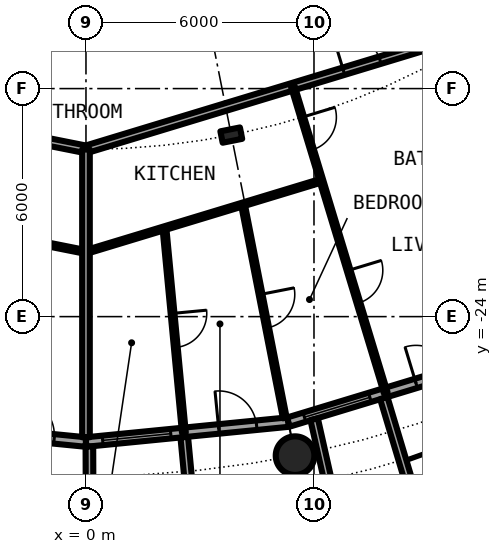
"""IFC4 building model, lengths in metres.
Left out: names, types, materials, properties, quantities, classifications, styles, units other than length and angle.
Written with IfcOpenShell. Run it as: python <this file> out.ifc"""

import sys

from ifc_helpers import new_model, si_unit, direction, frame, frame_2d, origin, origin_2d, place, context, subcontext, project, spatial, rectangle, hollow_circle, i_section, extrude, element, fill, save


model = new_model("IFC4")
c1 = context("Model", 3, precision=1e-05, world=origin(), true_north=direction((0.0, 1.0)))
c2 = subcontext(c1, "Body", "Model", "MODEL_VIEW")
j1 = project(units=[si_unit("LENGTHUNIT", "METRE"), si_unit("PLANEANGLEUNIT", "RADIAN")], contexts=[c1])
p1 = place(None, origin())
s1 = spatial("IfcSite", under=j1, at=p1, CompositionType="ELEMENT")
p2 = place(p1, origin())
s2 = spatial("IfcBuilding", under=s1, at=p2, CompositionType="ELEMENT")
p3 = place(p2, frame((0.0, 0.0, 91.05)))
s3 = spatial("IfcBuildingStorey", under=s2, at=p3, CompositionType="ELEMENT", Elevation=91.05)
p4 = place(p3, frame((5.501, -27.658, 0.0), z_axis=(0.0, 0.0, 1.0), x_axis=(1.0, 0.0, 0.0)))
e1 = element("IfcColumn", 1, at=p4, inside=s3, PredefinedType="COLUMN", context=c2, shape_type="SweptSolid", body=[
    extrude(hollow_circle(Radius=0.508, WallThickness=0.04, at=origin_2d()), origin(), (0.0, 0.0, 1.0), 3.05),
])
p5 = place(p3, frame((3.824, -19.223, 0.0), z_axis=(0.0, 0.0, 1.0), x_axis=(0.195090322016, -0.980785280403, 0.0)))
e2 = element("IfcColumn", 2, at=p5, inside=s3, PredefinedType="COLUMN", context=c2, shape_type="SweptSolid", body=[
    extrude(i_section(OverallWidth=0.306, OverallDepth=0.524, WebThickness=0.021, FlangeThickness=0.04, FilletRadius=0.027, at=origin_2d()), origin(), (0.0, 0.0, 1.0), 3.05),
])
p6 = place(p3, frame((-5.326, -26.775, 0.0), z_axis=(0.0, 0.0, 1.0), x_axis=(0.995173996315, -0.098126026407, 0.0)))
e3 = element("IfcWall", 3, at=p6, inside=s3, PredefinedType="SOLIDWALL", context=c2, shape_type="SweptSolid", body=[
    extrude(rectangle(XDim=5.352, YDim=0.25, at=frame_2d((2.676, 0.0))), origin(), (0.0, 0.0, 1.0), 2.7),
])
p7 = place(p6, frame((0.441, 0.0, 0.3)))
e4 = element("IfcOpeningElement", 4, at=p7, cuts=e3, PredefinedType="OPENING", context=c2, shape_type="SweptSolid", body=[
    extrude(rectangle(XDim=1.8, YDim=2.1, at=frame_2d((0.9, 1.05))), frame((0.0, 0.135, 0.0), z_axis=(0.0, -1.0, 0.0), x_axis=(1.0, 0.0, 0.0)), (0.0, 0.0, 1.0), 0.27),
])
p8 = place(p6, frame((3.51, 0.0, 0.0)))
e5 = element("IfcOpeningElement", 5, at=p8, cuts=e3, PredefinedType="OPENING", context=c2, shape_type="SweptSolid", body=[
    extrude(rectangle(XDim=1.0, YDim=2.2, at=frame_2d((0.5, 1.1))), frame((0.0, 0.135, 0.0), z_axis=(0.0, -1.0, 0.0), x_axis=(1.0, 0.0, 0.0)), (0.0, 0.0, 1.0), 0.27),
])
p9 = place(p3, frame((0.0, -27.3, 0.0), z_axis=(0.0, 0.0, 1.0), x_axis=(0.995173996315, 0.098126026407, 0.0)))
e6 = element("IfcWall", 6, at=p9, inside=s3, PredefinedType="SOLIDWALL", context=c2, shape_type="SweptSolid", body=[
    extrude(rectangle(XDim=5.352, YDim=0.25, at=frame_2d((2.676, 0.0))), origin(), (0.0, 0.0, 1.0), 2.7),
])
p10 = place(p9, frame((0.441, 0.0, 0.3)))
e7 = element("IfcOpeningElement", 7, at=p10, cuts=e6, PredefinedType="OPENING", context=c2, shape_type="SweptSolid", body=[
    extrude(rectangle(XDim=1.8, YDim=2.1, at=frame_2d((0.9, 1.05))), frame((0.0, 0.135, 0.0), z_axis=(0.0, -1.0, 0.0), x_axis=(1.0, 0.0, 0.0)), (0.0, 0.0, 1.0), 0.27),
])
p11 = place(p9, frame((3.51, 0.0, 0.0)))
e8 = element("IfcOpeningElement", 8, at=p11, cuts=e6, PredefinedType="OPENING", context=c2, shape_type="SweptSolid", body=[
    extrude(rectangle(XDim=1.0, YDim=2.2, at=frame_2d((0.5, 1.1))), frame((0.0, 0.135, 0.0), z_axis=(0.0, -1.0, 0.0), x_axis=(1.0, 0.0, 0.0)), (0.0, 0.0, 1.0), 0.27),
])
p12 = place(p3, frame((0.09, -27.417, -0.03), z_axis=(0.0, 0.0, 1.0), x_axis=(0.00347308367, -0.999993968827, 0.0)))
e9 = element("IfcWall", 9, at=p12, inside=s3, PredefinedType="SOLIDWALL", context=c2, shape_type="SweptSolid", body=[
    extrude(rectangle(XDim=2.882, YDim=0.2, at=frame_2d((1.441, 0.0))), origin(), (0.0, 0.0, 1.0), 2.73),
])
p13 = place(p3, frame((2.586, -27.171, -0.03), z_axis=(0.0, 0.0, 1.0), x_axis=(0.094548432284, -0.995520262954, 0.0)))
e10 = element("IfcWall", 10, at=p13, inside=s3, PredefinedType="SOLIDWALL", context=c2, shape_type="SweptSolid", body=[
    extrude(rectangle(XDim=3.006, YDim=0.2, at=frame_2d((1.503, 0.0))), origin(), (0.0, 0.0, 1.0), 2.73),
])
p14 = place(p3, frame((5.326, -26.775, 0.0), z_axis=(0.0, 0.0, 1.0), x_axis=(0.956965678721, 0.290201119486, 0.0)))
e11 = element("IfcWall", 11, at=p14, inside=s3, PredefinedType="SOLIDWALL", context=c2, shape_type="SweptSolid", body=[
    extrude(rectangle(XDim=5.351, YDim=0.25, at=frame_2d((2.676, 0.0))), origin(), (0.0, 0.0, 1.0), 2.7),
])
p15 = place(p14, frame((0.441, 0.0, 0.3)))
e12 = element("IfcOpeningElement", 12, at=p15, cuts=e11, PredefinedType="OPENING", context=c2, shape_type="SweptSolid", body=[
    extrude(rectangle(XDim=1.8, YDim=2.1, at=frame_2d((0.9, 1.05))), frame((0.0, 0.135, 0.0), z_axis=(0.0, -1.0, 0.0), x_axis=(1.0, 0.0, 0.0)), (0.0, 0.0, 1.0), 0.27),
])
p16 = place(p14, frame((3.51, 0.0, 0.0)))
e13 = element("IfcOpeningElement", 13, at=p16, cuts=e11, PredefinedType="OPENING", context=c2, shape_type="SweptSolid", body=[
    extrude(rectangle(XDim=1.0, YDim=2.2, at=frame_2d((0.5, 1.1))), frame((0.0, 0.135, 0.0), z_axis=(0.0, -1.0, 0.0), x_axis=(1.0, 0.0, 0.0)), (0.0, 0.0, 1.0), 0.27),
])
p17 = place(p3, frame((6.004, -26.7, -0.03), z_axis=(0.0, 0.0, 1.0), x_axis=(0.219609259383, -0.975587911566, 0.0)))
e14 = element("IfcWall", 14, at=p17, inside=s3, PredefinedType="SOLIDWALL", context=c2, shape_type="SweptSolid", body=[
    extrude(rectangle(XDim=2.933, YDim=0.2, at=frame_2d((1.466, 0.0))), origin(), (0.0, 0.0, 1.0), 2.73),
])
p18 = place(p3, frame((7.837, -26.144, -0.03), z_axis=(0.0, 0.0, 1.0), x_axis=(0.287064767992, -0.957911174889, 0.0)))
e15 = element("IfcWall", 15, at=p18, inside=s3, PredefinedType="SOLIDWALL", context=c2, shape_type="SweptSolid", body=[
    extrude(rectangle(XDim=3.006, YDim=0.2, at=frame_2d((1.503, 0.0))), origin(), (0.0, 0.0, 1.0), 2.73),
])
p19 = place(p3, frame((-2.133, -21.876, 0.0), z_axis=(0.0, 0.0, 1.0), x_axis=(0.980804550577, -0.194993419292, 0.0)))
e16 = element("IfcWall", 16, at=p19, inside=s3, PredefinedType="PARTITIONING", context=c2, shape_type="SweptSolid", body=[
    extrude(rectangle(XDim=2.175, YDim=0.1, at=frame_2d((1.087, 0.0))), origin(), (0.0, 0.0, 1.0), 2.7),
])
p20 = place(p3, frame((0.0, -22.3, 0.0), z_axis=(0.0, 0.0, 1.0), x_axis=(0.956940987612, 0.290282528286, 0.0)))
e17 = element("IfcWall", 17, at=p20, inside=s3, PredefinedType="PARTITIONING", context=c2, shape_type="SweptSolid", body=[
    extrude(rectangle(XDim=6.477, YDim=0.1, at=frame_2d((3.238, 0.0))), origin(), (0.0, 0.0, 1.0), 2.7),
])
p21 = place(p3, frame((-7.501, -18.108, 0.0), z_axis=(0.0, 0.0, 1.0), x_axis=(0.980781515054, -0.195109250749, 0.0)))
e18 = element("IfcWall", 18, at=p21, inside=s3, PredefinedType="PARTITIONING", context=c2, shape_type="SweptSolid", body=[
    extrude(rectangle(XDim=7.648, YDim=0.2, at=frame_2d((3.824, 0.0))), origin(), (0.0, 0.0, 1.0), 2.38),
])
p22 = place(p21, frame((2.25, 0.0, 0.0)))
e19 = element("IfcOpeningElement", 19, at=p22, cuts=e18, PredefinedType="OPENING", context=c2, shape_type="SweptSolid", body=[
    extrude(rectangle(XDim=1.0, YDim=2.3, at=frame_2d((0.5, 1.15))), frame((0.0, 0.11, 0.0), z_axis=(0.0, -1.0, 0.0), x_axis=(1.0, 0.0, 0.0)), (0.0, 0.0, 1.0), 0.22),
])
p23 = place(p3, frame((0.0, -19.6, 0.0), z_axis=(0.0, 0.0, 1.0), x_axis=(0.956932298225, 0.290311172044, 0.0)))
e20 = element("IfcWall", 20, at=p23, inside=s3, PredefinedType="PARTITIONING", context=c2, shape_type="SweptSolid", body=[
    extrude(rectangle(XDim=11.219, YDim=0.2, at=frame_2d((5.61, 0.0))), origin(), (0.0, 0.0, 1.0), 2.38),
])
p24 = place(p23, frame((7.086, 0.0, 0.0)))
e21 = element("IfcOpeningElement", 21, at=p24, cuts=e20, PredefinedType="OPENING", context=c2, shape_type="SweptSolid", body=[
    extrude(rectangle(XDim=1.0, YDim=2.3, at=frame_2d((0.5, 1.15))), frame((0.0, 0.11, 0.0), z_axis=(0.0, -1.0, 0.0), x_axis=(1.0, 0.0, 0.0)), (0.0, 0.0, 1.0), 0.22),
])
p25 = place(p3, frame((0.0, -27.175, 0.0), z_axis=(0.0, 0.0, 1.0), x_axis=(0.0, 1.0, 0.0)))
e22 = element("IfcWall", 22, at=p25, inside=s3, PredefinedType="PARTITIONING", context=c2, shape_type="SweptSolid", body=[
    extrude(rectangle(XDim=7.575, YDim=0.2, at=frame_2d((3.788, 0.0))), origin(), (0.0, 0.0, 1.0), 2.7),
])
p26 = place(p3, frame((2.065, -21.674, 0.0), z_axis=(0.0, 0.0, 1.0), x_axis=(0.094751520537, -0.99550095397, 0.0)))
e23 = element("IfcWall", 23, at=p26, inside=s3, PredefinedType="PARTITIONING", context=c2, shape_type="SweptSolid", body=[
    extrude(rectangle(XDim=5.403, YDim=0.1, at=frame_2d((2.702, 0.0))), origin(), (0.0, 0.0, 1.0), 2.7),
])
p27 = place(p26, frame((2.252, 0.0, 0.0)))
e24 = element("IfcOpeningElement", 24, at=p27, cuts=e23, PredefinedType="OPENING", context=c2, shape_type="SweptSolid", body=[
    extrude(rectangle(XDim=0.9, YDim=2.3, at=frame_2d((0.45, 1.15))), frame((0.0, 0.06, 0.0), z_axis=(0.0, -1.0, 0.0), x_axis=(1.0, 0.0, 0.0)), (0.0, 0.0, 1.0), 0.12),
])
p28 = place(p3, frame((4.13, -21.047, 0.0), z_axis=(0.0, 0.0, 1.0), x_axis=(0.192433779325, -0.981309961518, 0.0)))
e25 = element("IfcWall", 25, at=p28, inside=s3, PredefinedType="PARTITIONING", context=c2, shape_type="SweptSolid", body=[
    extrude(rectangle(XDim=5.727, YDim=0.1, at=frame_2d((2.863, 0.0))), origin(), (0.0, 0.0, 1.0), 2.7),
])
p29 = place(p28, frame((2.414, 0.0, 0.0)))
e26 = element("IfcOpeningElement", 26, at=p29, cuts=e25, PredefinedType="OPENING", context=c2, shape_type="SweptSolid", body=[
    extrude(rectangle(XDim=0.9, YDim=2.3, at=frame_2d((0.45, 1.15))), frame((0.0, 0.06, 0.0), z_axis=(0.0, -1.0, 0.0), x_axis=(1.0, 0.0, 0.0)), (0.0, 0.0, 1.0), 0.12),
])
p30 = place(p3, frame((5.445, -17.948, 0.0), z_axis=(0.0, 0.0, 1.0), x_axis=(0.290158700753, -0.956978541231, 0.0)))
e27 = element("IfcWall", 27, at=p30, inside=s3, PredefinedType="PARTITIONING", context=c2, shape_type="SweptSolid", body=[
    extrude(rectangle(XDim=8.419, YDim=0.1, at=frame_2d((4.209, 0.0))), origin(), (0.0, 0.0, 1.0), 2.7),
])
p31 = place(p30, frame((0.842, 0.0, 0.0)))
e28 = element("IfcOpeningElement", 28, at=p31, cuts=e27, PredefinedType="OPENING", context=c2, shape_type="SweptSolid", body=[
    extrude(rectangle(XDim=0.9, YDim=2.3, at=frame_2d((0.45, 1.15))), frame((0.0, 0.06, 0.0), z_axis=(0.0, -1.0, 0.0), x_axis=(1.0, 0.0, 0.0)), (0.0, 0.0, 1.0), 0.12),
])
p32 = place(p30, frame((5.052, 0.0, 0.0)))
e29 = element("IfcOpeningElement", 29, at=p32, cuts=e27, PredefinedType="OPENING", context=c2, shape_type="SweptSolid", body=[
    extrude(rectangle(XDim=0.9, YDim=2.3, at=frame_2d((0.45, 1.15))), frame((0.0, 0.06, 0.0), z_axis=(0.0, -1.0, 0.0), x_axis=(1.0, 0.0, 0.0)), (0.0, 0.0, 1.0), 0.12),
])
p33 = place(p8, origin())
e30 = element("IfcDoor", 30, at=p33, inside=s3, OperationType="SINGLE_SWING_LEFT", PredefinedType="DOOR", context=c2, shape_type="SweptSolid", body=[
    extrude(rectangle(XDim=1.0, YDim=2.2, at=frame_2d((0.5, 1.1))), frame((0.0, 0.025, 0.0), z_axis=(0.0, -1.0, 0.0), x_axis=(1.0, 0.0, 0.0)), (0.0, 0.0, 1.0), 0.05),
])
fill(e5, e30)
p34 = place(p10, origin())
e31 = element("IfcWindow", 31, at=p34, inside=s3, PartitioningType="SINGLE_PANEL", PredefinedType="WINDOW", context=c2, shape_type="SweptSolid", body=[
    extrude(rectangle(XDim=1.8, YDim=2.1, at=frame_2d((0.9, 1.05))), frame((0.0, 0.03, 0.0), z_axis=(0.0, -1.0, 0.0), x_axis=(1.0, 0.0, 0.0)), (0.0, 0.0, 1.0), 0.06),
])
fill(e7, e31)
p35 = place(p11, origin())
e32 = element("IfcDoor", 32, at=p35, inside=s3, OperationType="SINGLE_SWING_LEFT", PredefinedType="DOOR", context=c2, shape_type="SweptSolid", body=[
    extrude(rectangle(XDim=1.0, YDim=2.2, at=frame_2d((0.5, 1.1))), frame((0.0, 0.025, 0.0), z_axis=(0.0, -1.0, 0.0), x_axis=(1.0, 0.0, 0.0)), (0.0, 0.0, 1.0), 0.05),
])
fill(e8, e32)
p36 = place(p15, origin())
e33 = element("IfcWindow", 33, at=p36, inside=s3, PartitioningType="SINGLE_PANEL", PredefinedType="WINDOW", context=c2, shape_type="SweptSolid", body=[
    extrude(rectangle(XDim=1.8, YDim=2.1, at=frame_2d((0.9, 1.05))), frame((0.0, 0.03, 0.0), z_axis=(0.0, -1.0, 0.0), x_axis=(1.0, 0.0, 0.0)), (0.0, 0.0, 1.0), 0.06),
])
fill(e12, e33)
p37 = place(p16, origin())
e34 = element("IfcDoor", 34, at=p37, inside=s3, OperationType="SINGLE_SWING_LEFT", PredefinedType="DOOR", context=c2, shape_type="SweptSolid", body=[
    extrude(rectangle(XDim=1.0, YDim=2.2, at=frame_2d((0.5, 1.1))), frame((0.0, 0.025, 0.0), z_axis=(0.0, -1.0, 0.0), x_axis=(1.0, 0.0, 0.0)), (0.0, 0.0, 1.0), 0.05),
])
fill(e13, e34)
p38 = place(p24, origin())
e35 = element("IfcDoor", 35, at=p38, inside=s3, OperationType="SINGLE_SWING_RIGHT", PredefinedType="DOOR", context=c2, shape_type="SweptSolid", body=[
    extrude(rectangle(XDim=1.0, YDim=2.3, at=frame_2d((0.5, 1.15))), frame((0.0, 0.025, 0.0), z_axis=(0.0, -1.0, 0.0), x_axis=(1.0, 0.0, 0.0)), (0.0, 0.0, 1.0), 0.05),
])
fill(e21, e35)
p39 = place(p31, origin())
e36 = element("IfcDoor", 36, at=p39, inside=s3, OperationType="SINGLE_SWING_LEFT", PredefinedType="DOOR", context=c2, shape_type="SweptSolid", body=[
    extrude(rectangle(XDim=0.9, YDim=2.3, at=frame_2d((0.45, 1.15))), frame((0.0, 0.025, 0.0), z_axis=(0.0, -1.0, 0.0), x_axis=(1.0, 0.0, 0.0)), (0.0, 0.0, 1.0), 0.05),
])
fill(e28, e36)
p40 = place(p32, origin())
e37 = element("IfcDoor", 37, at=p40, inside=s3, OperationType="SINGLE_SWING_RIGHT", PredefinedType="DOOR", context=c2, shape_type="SweptSolid", body=[
    extrude(rectangle(XDim=0.9, YDim=2.3, at=frame_2d((0.45, 1.15))), frame((0.0, 0.025, 0.0), z_axis=(0.0, -1.0, 0.0), x_axis=(1.0, 0.0, 0.0)), (0.0, 0.0, 1.0), 0.05),
])
fill(e29, e37)
p41 = place(p29, origin())
e38 = element("IfcDoor", 38, at=p41, inside=s3, OperationType="SINGLE_SWING_RIGHT", PredefinedType="DOOR", context=c2, shape_type="SweptSolid", body=[
    extrude(rectangle(XDim=0.9, YDim=2.3, at=frame_2d((0.45, 1.15))), frame((0.0, 0.025, 0.0), z_axis=(0.0, -1.0, 0.0), x_axis=(1.0, 0.0, 0.0)), (0.0, 0.0, 1.0), 0.05),
])
fill(e26, e38)
p42 = place(p27, origin())
e39 = element("IfcDoor", 39, at=p42, inside=s3, OperationType="SINGLE_SWING_LEFT", PredefinedType="DOOR", context=c2, shape_type="SweptSolid", body=[
    extrude(rectangle(XDim=0.9, YDim=2.3, at=frame_2d((0.45, 1.15))), frame((0.0, 0.025, 0.0), z_axis=(0.0, -1.0, 0.0), x_axis=(1.0, 0.0, 0.0)), (0.0, 0.0, 1.0), 0.05),
])
fill(e24, e39)
save(model, sys.argv[1])
